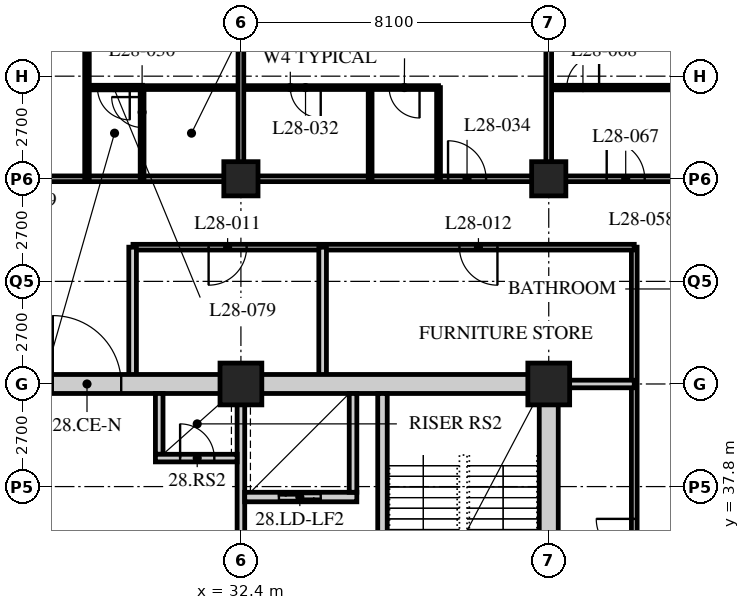
"""IFC4 building model, lengths in metres.
Left out: names, types, materials, properties, quantities, classifications, styles, units other than length and angle.
Written with IfcOpenShell. Run it as: python <this file> out.ifc"""

import sys

from ifc_helpers import new_model, si_unit, direction, frame, frame_2d, origin, origin_2d, place, context, subcontext, project, spatial, rectangle, hollow_rectangle, extrude, element, fill, save


model = new_model("IFC4")
c1 = context("Model", 3, precision=1e-05, world=origin(), true_north=direction((0.0, 1.0)))
c2 = subcontext(c1, "Body", "Model", "MODEL_VIEW")
j1 = project(units=[si_unit("LENGTHUNIT", "METRE"), si_unit("PLANEANGLEUNIT", "RADIAN")], contexts=[c1])
p1 = place(None, origin())
s1 = spatial("IfcSite", under=j1, at=p1, CompositionType="ELEMENT")
p2 = place(p1, origin())
s2 = spatial("IfcBuilding", under=s1, at=p2, CompositionType="ELEMENT")
p3 = place(p2, frame((0.0, 0.0, 113.6)))
s3 = spatial("IfcBuildingStorey", under=s2, at=p3, CompositionType="ELEMENT", Elevation=113.6)
p4 = place(p3, frame((32.4, 40.5, 0.0), z_axis=(0.0, 0.0, 1.0), x_axis=(1.0, 0.0, 0.0)))
e1 = element("IfcColumn", 1, at=p4, inside=s3, PredefinedType="COLUMN", context=c2, shape_type="SweptSolid", body=[
    extrude(hollow_rectangle(XDim=1.1, YDim=1.1, WallThickness=0.1, at=origin_2d()), origin(), (0.0, 0.0, 1.0), 3.4),
])
p5 = place(p3, frame((32.4, 45.9, 0.0), z_axis=(0.0, 0.0, 1.0), x_axis=(1.0, 0.0, 0.0)))
e2 = element("IfcColumn", 2, at=p5, inside=s3, PredefinedType="COLUMN", context=c2, shape_type="SweptSolid", body=[
    extrude(hollow_rectangle(XDim=0.9, YDim=0.9, WallThickness=0.09, at=origin_2d()), origin(), (0.0, 0.0, 1.0), 3.4),
])
p6 = place(p3, frame((40.5, 40.5, 0.0), z_axis=(0.0, 0.0, 1.0), x_axis=(1.0, 0.0, 0.0)))
e3 = element("IfcColumn", 3, at=p6, inside=s3, PredefinedType="COLUMN", context=c2, shape_type="SweptSolid", body=[
    extrude(hollow_rectangle(XDim=1.1, YDim=1.1, WallThickness=0.1, at=origin_2d()), origin(), (0.0, 0.0, 1.0), 3.4),
])
p7 = place(p3, frame((40.5, 45.9, 0.0), z_axis=(0.0, 0.0, 1.0), x_axis=(1.0, 0.0, 0.0)))
e4 = element("IfcColumn", 4, at=p7, inside=s3, PredefinedType="COLUMN", context=c2, shape_type="SweptSolid", body=[
    extrude(hollow_rectangle(XDim=0.9, YDim=0.9, WallThickness=0.09, at=origin_2d()), origin(), (0.0, 0.0, 1.0), 3.4),
])
p8 = place(p3, frame((12.15, 45.9, 0.0), z_axis=(0.0, 0.0, 1.0), x_axis=(1.0, 0.0, 0.0)))
e5 = element("IfcWall", 5, at=p8, inside=s3, PredefinedType="PARTITIONING", context=c2, shape_type="SweptSolid", body=[
    extrude(rectangle(XDim=32.4, YDim=0.15, at=frame_2d((16.2, 0.0))), origin(), (0.0, 0.0, 1.0), 2.578),
])
p9 = place(p8, frame((5.95, 0.0, 0.0)))
e6 = element("IfcOpeningElement", 6, at=p9, cuts=e5, PredefinedType="OPENING", context=c2, shape_type="SweptSolid", body=[
    extrude(rectangle(XDim=1.0, YDim=2.1, at=frame_2d((0.5, 1.05))), frame((0.0, 0.085, 0.0), z_axis=(0.0, -1.0, 0.0), x_axis=(1.0, 0.0, 0.0)), (0.0, 0.0, 1.0), 0.17),
])
p10 = place(p8, frame((14.05, 0.0, 0.0)))
e7 = element("IfcOpeningElement", 7, at=p10, cuts=e5, PredefinedType="OPENING", context=c2, shape_type="SweptSolid", body=[
    extrude(rectangle(XDim=1.0, YDim=2.1, at=frame_2d((0.5, 1.05))), frame((0.0, 0.085, 0.0), z_axis=(0.0, -1.0, 0.0), x_axis=(1.0, 0.0, 0.0)), (0.0, 0.0, 1.0), 0.17),
])
p11 = place(p8, frame((25.7, 0.0, 0.0)))
e8 = element("IfcOpeningElement", 8, at=p11, cuts=e5, PredefinedType="OPENING", context=c2, shape_type="SweptSolid", body=[
    extrude(rectangle(XDim=1.0, YDim=2.1, at=frame_2d((0.5, 1.05))), frame((0.0, 0.085, 0.0), z_axis=(0.0, -1.0, 0.0), x_axis=(1.0, 0.0, 0.0)), (0.0, 0.0, 1.0), 0.17),
])
p12 = place(p8, frame((29.875, 0.0, 0.0)))
e9 = element("IfcOpeningElement", 9, at=p12, cuts=e5, PredefinedType="OPENING", context=c2, shape_type="SweptSolid", body=[
    extrude(rectangle(XDim=1.0, YDim=2.1, at=frame_2d((0.5, 1.05))), frame((0.0, 0.085, 0.0), z_axis=(0.0, -1.0, 0.0), x_axis=(1.0, 0.0, 0.0)), (0.0, 0.0, 1.0), 0.17),
])
p13 = place(p8, frame((1.525, 0.0, 0.0)))
e10 = element("IfcOpeningElement", 10, at=p13, cuts=e5, PredefinedType="OPENING", context=c2, shape_type="SweptSolid", body=[
    extrude(rectangle(XDim=1.0, YDim=2.1, at=frame_2d((0.5, 1.05))), frame((0.0, 0.085, 0.0), z_axis=(0.0, -1.0, 0.0), x_axis=(1.0, 0.0, 0.0)), (0.0, 0.0, 1.0), 0.17),
])
p14 = place(p3, frame((42.75, 19.35, 0.0), z_axis=(0.0, 0.0, 1.0), x_axis=(0.0, 1.0, 0.0)))
e11 = element("IfcWall", 11, at=p14, inside=s3, PredefinedType="PARTITIONING", context=c2, shape_type="SweptSolid", body=[
    extrude(rectangle(XDim=24.75, YDim=0.15, at=frame_2d((12.375, 0.0))), origin(), (0.0, 0.0, 1.0), 3.19),
])
p15 = place(p14, frame((8.5, 0.0, 0.0)))
e12 = element("IfcOpeningElement", 12, at=p15, cuts=e11, PredefinedType="OPENING", context=c2, shape_type="SweptSolid", body=[
    extrude(rectangle(XDim=1.0, YDim=2.1, at=frame_2d((0.5, 1.05))), frame((0.0, 0.085, 0.0), z_axis=(0.0, -1.0, 0.0), x_axis=(1.0, 0.0, 0.0)), (0.0, 0.0, 1.0), 0.17),
])
p16 = place(p14, frame((16.6, 0.0, 0.0)))
e13 = element("IfcOpeningElement", 13, at=p16, cuts=e11, PredefinedType="OPENING", context=c2, shape_type="SweptSolid", body=[
    extrude(rectangle(XDim=1.0, YDim=2.1, at=frame_2d((0.5, 1.05))), frame((0.0, 0.085, 0.0), z_axis=(0.0, -1.0, 0.0), x_axis=(1.0, 0.0, 0.0)), (0.0, 0.0, 1.0), 0.17),
])
p17 = place(p3, frame((42.75, 44.1, 0.0), z_axis=(0.0, 0.0, 1.0), x_axis=(-1.0, 0.0, 0.0)))
e14 = element("IfcWall", 14, at=p17, inside=s3, PredefinedType="PARTITIONING", context=c2, shape_type="SweptSolid", body=[
    extrude(rectangle(XDim=13.19, YDim=0.15, at=frame_2d((6.595, 0.0))), origin(), (0.0, 0.0, 1.0), 3.19),
])
p18 = place(p17, frame((10.2, 0.0, 0.0)))
e15 = element("IfcOpeningElement", 15, at=p18, cuts=e14, PredefinedType="OPENING", context=c2, shape_type="SweptSolid", body=[
    extrude(rectangle(XDim=1.0, YDim=2.1, at=frame_2d((0.5, 1.05))), frame((0.0, 0.085, 0.0), z_axis=(0.0, -1.0, 0.0), x_axis=(1.0, 0.0, 0.0)), (0.0, 0.0, 1.0), 0.17),
])
p19 = place(p17, frame((3.6, 0.0, 0.0)))
e16 = element("IfcOpeningElement", 16, at=p19, cuts=e14, PredefinedType="OPENING", context=c2, shape_type="SweptSolid", body=[
    extrude(rectangle(XDim=1.0, YDim=2.1, at=frame_2d((0.5, 1.05))), frame((0.0, 0.085, 0.0), z_axis=(0.0, -1.0, 0.0), x_axis=(1.0, 0.0, 0.0)), (0.0, 0.0, 1.0), 0.17),
])
for number, where, z_axis, x_axis in (
    (17, (34.55, 44.1, 0.0), (0.0, 0.0, 1.0), (0.0, -1.0, 0.0)),
    (18, (29.55, 40.5, 0.0), (0.0, 0.0, 1.0), (0.0, 1.0, 0.0)),
):
    element("IfcWall", number, at=place(p3, frame(where, z_axis=z_axis, x_axis=x_axis)), inside=s3, PredefinedType="SOLIDWALL", context=c2, shape_type="SweptSolid", body=[
        extrude(rectangle(XDim=3.6, YDim=0.2, at=frame_2d((1.8, 0.0))), origin(), (0.0, 0.0, 1.0), 3.19),
    ])
p20 = place(p3, frame((40.5, 40.5, 0.0), z_axis=(0.0, 0.0, 1.0), x_axis=(1.0, 0.0, 0.0)))
e19 = element("IfcWall", 19, at=p20, inside=s3, PredefinedType="SOLIDWALL", context=c2, shape_type="SweptSolid", body=[
    extrude(rectangle(XDim=2.25, YDim=0.2, at=frame_2d((1.125, 0.0))), origin(), (0.0, 0.0, 1.0), 3.19),
])
p21 = place(p3, frame((29.8, 48.3, 0.0), z_axis=(0.0, 0.0, 1.0), x_axis=(1.0, 0.0, 0.0)))
e20 = element("IfcWall", 20, at=p21, inside=s3, PredefinedType="PARTITIONING", context=c2, shape_type="SweptSolid", body=[
    extrude(rectangle(XDim=7.8, YDim=0.1, at=frame_2d((3.9, 0.0))), origin(), (0.0, 0.0, 1.0), 3.19),
])
p22 = place(p21, frame((3.9, 0.0, 0.0)))
e21 = element("IfcOpeningElement", 21, at=p22, cuts=e20, PredefinedType="OPENING", context=c2, shape_type="SweptSolid", body=[
    extrude(rectangle(XDim=0.8, YDim=2.1, at=frame_2d((0.4, 1.05))), frame((0.0, 0.06, 0.0), z_axis=(0.0, -1.0, 0.0), x_axis=(1.0, 0.0, 0.0)), (0.0, 0.0, 1.0), 0.12),
])
p23 = place(p21, frame((6.5, 0.0, 0.0)))
e22 = element("IfcOpeningElement", 22, at=p23, cuts=e20, PredefinedType="OPENING", context=c2, shape_type="SweptSolid", body=[
    extrude(rectangle(XDim=0.8, YDim=2.1, at=frame_2d((0.4, 1.05))), frame((0.0, 0.06, 0.0), z_axis=(0.0, -1.0, 0.0), x_axis=(1.0, 0.0, 0.0)), (0.0, 0.0, 1.0), 0.12),
])
p24 = place(p3, frame((29.8, 45.9, 0.0), z_axis=(0.0, 0.0, 1.0), x_axis=(0.0, 1.0, 0.0)))
e23 = element("IfcWall", 23, at=p24, inside=s3, PredefinedType="PARTITIONING", context=c2, shape_type="SweptSolid", body=[
    extrude(rectangle(XDim=2.4, YDim=0.1, at=frame_2d((1.2, 0.0))), origin(), (0.0, 0.0, 1.0), 3.19),
])
p25 = place(p24, frame((1.35, 0.0, 0.0)))
e24 = element("IfcOpeningElement", 24, at=p25, cuts=e23, PredefinedType="OPENING", context=c2, shape_type="SweptSolid", body=[
    extrude(rectangle(XDim=0.8, YDim=2.1, at=frame_2d((0.4, 1.05))), frame((0.0, 0.06, 0.0), z_axis=(0.0, -1.0, 0.0), x_axis=(1.0, 0.0, 0.0)), (0.0, 0.0, 1.0), 0.12),
])
p26 = place(p3, frame((28.35, 45.9, 0.0), z_axis=(0.0, 0.0, 1.0), x_axis=(0.0, 1.0, 0.0)))
e25 = element("IfcWall", 25, at=p26, inside=s3, PredefinedType="PARTITIONING", context=c2, shape_type="SweptSolid", body=[
    extrude(rectangle(XDim=7.8, YDim=0.12, at=frame_2d((3.9, 0.0))), origin(), (0.0, 0.0, 1.0), 3.19),
])
p27 = place(p26, frame((4.825, 0.0, 0.0)))
e26 = element("IfcOpeningElement", 26, at=p27, cuts=e25, PredefinedType="OPENING", context=c2, shape_type="SweptSolid", body=[
    extrude(rectangle(XDim=0.85, YDim=2.1, at=frame_2d((0.425, 1.05))), frame((0.0, 0.07, 0.0), z_axis=(0.0, -1.0, 0.0), x_axis=(1.0, 0.0, 0.0)), (0.0, 0.0, 1.0), 0.14),
])
p28 = place(p3, frame((32.4, 45.9, 0.0), z_axis=(0.0, 0.0, 1.0), x_axis=(0.0, 1.0, 0.0)))
e27 = element("IfcWall", 27, at=p28, inside=s3, PredefinedType="PARTITIONING", context=c2, shape_type="SweptSolid", body=[
    extrude(rectangle(XDim=7.8, YDim=0.15, at=frame_2d((3.9, 0.0))), origin(), (0.0, 0.0, 1.0), 2.578),
])
for number, where, z_axis, x_axis in (
    (28, (35.8, 45.9, 0.0), (0.0, 0.0, 1.0), (0.0, 1.0, 0.0)),
    (29, (37.6, 45.9, 0.0), (0.0, 0.0, 1.0), (0.0, 1.0, 0.0)),
):
    element("IfcWall", number, at=place(p3, frame(where, z_axis=z_axis, x_axis=x_axis)), inside=s3, PredefinedType="PARTITIONING", context=c2, shape_type="SweptSolid", body=[
        extrude(rectangle(XDim=2.4, YDim=0.1, at=frame_2d((1.2, 0.0))), origin(), (0.0, 0.0, 1.0), 3.19),
    ])
p29 = place(p3, frame((40.5, 48.3, 0.0), z_axis=(0.0, 0.0, 1.0), x_axis=(1.0, 0.0, 0.0)))
e30 = element("IfcWall", 30, at=p29, inside=s3, PredefinedType="PARTITIONING", context=c2, shape_type="SweptSolid", body=[
    extrude(rectangle(XDim=8.05, YDim=0.12, at=frame_2d((4.025, 0.0))), origin(), (0.0, 0.0, 1.0), 3.19),
])
p30 = place(p29, frame((0.475, 0.0, 0.0)))
e31 = element("IfcOpeningElement", 31, at=p30, cuts=e30, PredefinedType="OPENING", context=c2, shape_type="SweptSolid", body=[
    extrude(rectangle(XDim=0.85, YDim=2.1, at=frame_2d((0.425, 1.05))), frame((0.0, 0.07, 0.0), z_axis=(0.0, -1.0, 0.0), x_axis=(1.0, 0.0, 0.0)), (0.0, 0.0, 1.0), 0.14),
])
p31 = place(p29, frame((4.325, 0.0, 0.0)))
e32 = element("IfcOpeningElement", 32, at=p31, cuts=e30, PredefinedType="OPENING", context=c2, shape_type="SweptSolid", body=[
    extrude(rectangle(XDim=0.85, YDim=2.1, at=frame_2d((0.425, 1.05))), frame((0.0, 0.07, 0.0), z_axis=(0.0, -1.0, 0.0), x_axis=(1.0, 0.0, 0.0)), (0.0, 0.0, 1.0), 0.14),
])
p32 = place(p3, frame((40.5, 45.9, 0.0), z_axis=(0.0, 0.0, 1.0), x_axis=(0.0, 1.0, 0.0)))
e33 = element("IfcWall", 33, at=p32, inside=s3, PredefinedType="PARTITIONING", context=c2, shape_type="SweptSolid", body=[
    extrude(rectangle(XDim=7.8, YDim=0.15, at=frame_2d((3.9, 0.0))), origin(), (0.0, 0.0, 1.0), 2.578),
])
p33 = place(p3, frame((28.35, 48.3, 0.0), z_axis=(0.0, 0.0, 1.0), x_axis=(1.0, 0.0, 0.0)))
e34 = element("IfcWall", 34, at=p33, inside=s3, PredefinedType="PARTITIONING", context=c2, shape_type="SweptSolid", body=[
    extrude(rectangle(XDim=1.46, YDim=0.12, at=frame_2d((0.73, 0.0))), origin(), (0.0, 0.0, 1.0), 3.19),
])
p34 = place(p33, frame((0.275, 0.0, 0.0)))
e35 = element("IfcOpeningElement", 35, at=p34, cuts=e34, PredefinedType="OPENING", context=c2, shape_type="SweptSolid", body=[
    extrude(rectangle(XDim=0.85, YDim=2.1, at=frame_2d((0.425, 1.05))), frame((0.0, 0.07, 0.0), z_axis=(0.0, -1.0, 0.0), x_axis=(1.0, 0.0, 0.0)), (0.0, 0.0, 1.0), 0.14),
])
p35 = place(p3, frame((15.95, 40.5, 0.0), z_axis=(0.0, 0.0, 1.0), x_axis=(1.0, 0.0, 0.0)))
e36 = element("IfcWall", 36, at=p35, inside=s3, PredefinedType="SOLIDWALL", context=c2, shape_type="SweptSolid", body=[
    extrude(rectangle(XDim=24.8, YDim=0.5, at=frame_2d((12.4, 0.0))), origin(), (0.0, 0.0, 1.0), 2.54),
])
p36 = place(p35, frame((11.5, 0.0, 0.0)))
e37 = element("IfcOpeningElement", 37, at=p36, cuts=e36, PredefinedType="OPENING", context=c2, shape_type="SweptSolid", body=[
    extrude(rectangle(XDim=1.8, YDim=2.4, at=frame_2d((0.9, 1.2))), frame((0.0, 0.26, 0.0), z_axis=(0.0, -1.0, 0.0), x_axis=(1.0, 0.0, 0.0)), (0.0, 0.0, 1.0), 0.52),
])
p37 = place(p3, frame((40.5, 24.55, 0.0), z_axis=(0.0, 0.0, 1.0), x_axis=(0.0, 1.0, 0.0)))
e38 = element("IfcWall", 38, at=p37, inside=s3, PredefinedType="SOLIDWALL", context=c2, shape_type="SweptSolid", body=[
    extrude(rectangle(XDim=15.7, YDim=0.5, at=frame_2d((7.85, 0.0))), origin(), (0.0, 0.0, 1.0), 2.578),
])
p38 = place(p3, frame((32.4, 32.5, 0.0), z_axis=(0.0, 0.0, 1.0), x_axis=(0.0, 1.0, 0.0)))
e39 = element("IfcWall", 39, at=p38, inside=s3, PredefinedType="SOLIDWALL", context=c2, shape_type="SweptSolid", body=[
    extrude(rectangle(XDim=7.75, YDim=0.2, at=frame_2d((3.875, 0.0))), origin(), (0.0, 0.0, 1.0), 2.578),
])
p39 = place(p38, frame((1.9, 0.0, 0.0)))
e40 = element("IfcOpeningElement", 40, at=p39, cuts=e39, PredefinedType="OPENING", context=c2, shape_type="SweptSolid", body=[
    extrude(rectangle(XDim=1.2, YDim=2.1, at=frame_2d((0.6, 1.05))), frame((0.0, 0.11, 0.0), z_axis=(0.0, -1.0, 0.0), x_axis=(1.0, 0.0, 0.0)), (0.0, 0.0, 1.0), 0.22),
])
p40 = place(p3, frame((36.125, 32.5, 0.0), z_axis=(0.0, 0.0, 1.0), x_axis=(0.0, 1.0, 0.0)))
e41 = element("IfcWall", 41, at=p40, inside=s3, PredefinedType="SOLIDWALL", context=c2, shape_type="SweptSolid", body=[
    extrude(rectangle(XDim=7.75, YDim=0.25, at=frame_2d((3.875, 0.0))), origin(), (0.0, 0.0, 1.0), 3.19),
])
p41 = place(p40, frame((0.45, 0.0, 0.0)))
e42 = element("IfcOpeningElement", 42, at=p41, cuts=e41, PredefinedType="OPENING", context=c2, shape_type="SweptSolid", body=[
    extrude(rectangle(XDim=1.2, YDim=2.1, at=frame_2d((0.6, 1.05))), frame((0.0, 0.135, 0.0), z_axis=(0.0, -1.0, 0.0), x_axis=(1.0, 0.0, 0.0)), (0.0, 0.0, 1.0), 0.27),
])
p42 = place(p3, frame((32.5, 37.525, 0.0), z_axis=(0.0, 0.0, 1.0), x_axis=(1.0, 0.0, 0.0)))
e43 = element("IfcWall", 43, at=p42, inside=s3, PredefinedType="SOLIDWALL", context=c2, shape_type="SweptSolid", body=[
    extrude(rectangle(XDim=2.95, YDim=0.25, at=frame_2d((1.475, 0.0))), origin(), (0.0, 0.0, 1.0), 3.19),
])
p43 = place(p42, frame((0.9, 0.0, 0.0)))
e44 = element("IfcOpeningElement", 44, at=p43, cuts=e43, PredefinedType="OPENING", context=c2, shape_type="SweptSolid", body=[
    extrude(rectangle(XDim=1.1, YDim=2.4, at=frame_2d((0.55, 1.2))), frame((0.0, 0.135, 0.0), z_axis=(0.0, -1.0, 0.0), x_axis=(1.0, 0.0, 0.0)), (0.0, 0.0, 1.0), 0.27),
])
p44 = place(p3, frame((35.35, 37.65, 0.0), z_axis=(0.0, 0.0, 1.0), x_axis=(0.0, 1.0, 0.0)))
e45 = element("IfcWall", 45, at=p44, inside=s3, PredefinedType="SOLIDWALL", context=c2, shape_type="SweptSolid", body=[
    extrude(rectangle(XDim=2.6, YDim=0.2, at=frame_2d((1.3, 0.0))), origin(), (0.0, 0.0, 1.0), 3.19),
])
p45 = place(p3, frame((30.25, 38.65, 0.0), z_axis=(0.0, 0.0, 1.0), x_axis=(0.0, 1.0, 0.0)))
e46 = element("IfcWall", 46, at=p45, inside=s3, PredefinedType="SOLIDWALL", context=c2, shape_type="SweptSolid", body=[
    extrude(rectangle(XDim=1.6, YDim=0.2, at=frame_2d((0.8, 0.0))), origin(), (0.0, 0.0, 1.0), 3.19),
])
p46 = place(p3, frame((30.15, 38.55, 0.0), z_axis=(0.0, 0.0, 1.0), x_axis=(1.0, 0.0, 0.0)))
e47 = element("IfcWall", 47, at=p46, inside=s3, PredefinedType="SOLIDWALL", context=c2, shape_type="SweptSolid", body=[
    extrude(rectangle(XDim=2.15, YDim=0.2, at=frame_2d((1.075, 0.0))), origin(), (0.0, 0.0, 1.0), 3.19),
])
p47 = place(p46, frame((0.65, 0.0, 0.0)))
e48 = element("IfcOpeningElement", 48, at=p47, cuts=e47, PredefinedType="OPENING", context=c2, shape_type="SweptSolid", body=[
    extrude(rectangle(XDim=0.9, YDim=2.1, at=frame_2d((0.45, 1.05))), frame((0.0, 0.11, 0.0), z_axis=(0.0, -1.0, 0.0), x_axis=(1.0, 0.0, 0.0)), (0.0, 0.0, 1.0), 0.22),
])
p48 = place(p16, origin())
e49 = element("IfcDoor", 49, at=p48, inside=s3, OperationType="SINGLE_SWING_RIGHT", PredefinedType="DOOR", context=c2, shape_type="SweptSolid", body=[
    extrude(rectangle(XDim=1.0, YDim=2.1, at=frame_2d((0.5, 1.05))), frame((0.0, 0.025, 0.0), z_axis=(0.0, -1.0, 0.0), x_axis=(1.0, 0.0, 0.0)), (0.0, 0.0, 1.0), 0.05),
])
fill(e13, e49)
p49 = place(p18, origin())
e50 = element("IfcDoor", 50, at=p49, inside=s3, OperationType="SINGLE_SWING_RIGHT", PredefinedType="DOOR", context=c2, shape_type="SweptSolid", body=[
    extrude(rectangle(XDim=1.0, YDim=2.1, at=frame_2d((0.5, 1.05))), frame((0.0, 0.025, 0.0), z_axis=(0.0, -1.0, 0.0), x_axis=(1.0, 0.0, 0.0)), (0.0, 0.0, 1.0), 0.05),
])
fill(e15, e50)
p50 = place(p19, origin())
e51 = element("IfcDoor", 51, at=p50, inside=s3, OperationType="SINGLE_SWING_LEFT", PredefinedType="DOOR", context=c2, shape_type="SweptSolid", body=[
    extrude(rectangle(XDim=1.0, YDim=2.1, at=frame_2d((0.5, 1.05))), frame((0.0, 0.025, 0.0), z_axis=(0.0, -1.0, 0.0), x_axis=(1.0, 0.0, 0.0)), (0.0, 0.0, 1.0), 0.05),
])
fill(e16, e51)
p51 = place(p25, origin())
e52 = element("IfcDoor", 52, at=p51, inside=s3, OperationType="SINGLE_SWING_RIGHT", PredefinedType="DOOR", context=c2, shape_type="SweptSolid", body=[
    extrude(rectangle(XDim=0.8, YDim=2.1, at=frame_2d((0.4, 1.05))), frame((0.0, 0.025, 0.0), z_axis=(0.0, -1.0, 0.0), x_axis=(1.0, 0.0, 0.0)), (0.0, 0.0, 1.0), 0.05),
])
fill(e24, e52)
p52 = place(p22, origin())
e53 = element("IfcDoor", 53, at=p52, inside=s3, OperationType="SINGLE_SWING_LEFT", PredefinedType="DOOR", context=c2, shape_type="SweptSolid", body=[
    extrude(rectangle(XDim=0.8, YDim=2.1, at=frame_2d((0.4, 1.05))), frame((0.0, 0.025, 0.0), z_axis=(0.0, -1.0, 0.0), x_axis=(1.0, 0.0, 0.0)), (0.0, 0.0, 1.0), 0.05),
])
fill(e21, e53)
p53 = place(p23, origin())
e54 = element("IfcDoor", 54, at=p53, inside=s3, OperationType="SINGLE_SWING_LEFT", PredefinedType="DOOR", context=c2, shape_type="SweptSolid", body=[
    extrude(rectangle(XDim=0.8, YDim=2.1, at=frame_2d((0.4, 1.05))), frame((0.0, 0.025, 0.0), z_axis=(0.0, -1.0, 0.0), x_axis=(1.0, 0.0, 0.0)), (0.0, 0.0, 1.0), 0.05),
])
fill(e22, e54)
p54 = place(p11, origin())
e55 = element("IfcDoor", 55, at=p54, inside=s3, OperationType="SINGLE_SWING_LEFT", PredefinedType="DOOR", context=c2, shape_type="SweptSolid", body=[
    extrude(rectangle(XDim=1.0, YDim=2.1, at=frame_2d((0.5, 1.05))), frame((0.0, 0.025, 0.0), z_axis=(0.0, -1.0, 0.0), x_axis=(1.0, 0.0, 0.0)), (0.0, 0.0, 1.0), 0.05),
])
fill(e8, e55)
p55 = place(p12, origin())
e56 = element("IfcDoor", 56, at=p55, inside=s3, OperationType="SINGLE_SWING_LEFT", PredefinedType="DOOR", context=c2, shape_type="SweptSolid", body=[
    extrude(rectangle(XDim=1.0, YDim=2.1, at=frame_2d((0.5, 1.05))), frame((0.0, 0.025, 0.0), z_axis=(0.0, -1.0, 0.0), x_axis=(1.0, 0.0, 0.0)), (0.0, 0.0, 1.0), 0.05),
])
fill(e9, e56)
p56 = place(p30, origin())
e57 = element("IfcDoor", 57, at=p56, inside=s3, OperationType="SINGLE_SWING_RIGHT", PredefinedType="DOOR", context=c2, shape_type="SweptSolid", body=[
    extrude(rectangle(XDim=0.85, YDim=2.1, at=frame_2d((0.425, 1.05))), frame((0.0, 0.025, 0.0), z_axis=(0.0, -1.0, 0.0), x_axis=(1.0, 0.0, 0.0)), (0.0, 0.0, 1.0), 0.05),
])
fill(e31, e57)
p57 = place(p34, origin())
e58 = element("IfcDoor", 58, at=p57, inside=s3, OperationType="SINGLE_SWING_LEFT", PredefinedType="DOOR", context=c2, shape_type="SweptSolid", body=[
    extrude(rectangle(XDim=0.85, YDim=2.1, at=frame_2d((0.425, 1.05))), frame((0.0, 0.025, 0.0), z_axis=(0.0, -1.0, 0.0), x_axis=(1.0, 0.0, 0.0)), (0.0, 0.0, 1.0), 0.05),
])
fill(e35, e58)
p58 = place(p47, origin())
e59 = element("IfcDoor", 59, at=p58, inside=s3, OperationType="SINGLE_SWING_LEFT", PredefinedType="DOOR", context=c2, shape_type="SweptSolid", body=[
    extrude(rectangle(XDim=0.9, YDim=2.1, at=frame_2d((0.45, 1.05))), frame((0.0, 0.025, 0.0), z_axis=(0.0, -1.0, 0.0), x_axis=(1.0, 0.0, 0.0)), (0.0, 0.0, 1.0), 0.05),
])
fill(e48, e59)
p59 = place(p43, origin())
e60 = element("IfcDoor", 60, at=p59, inside=s3, OperationType="DOUBLE_DOOR_SLIDING", PredefinedType="DOOR", context=c2, shape_type="SweptSolid", body=[
    extrude(rectangle(XDim=1.1, YDim=2.4, at=frame_2d((0.55, 1.2))), frame((0.0, 0.025, 0.0), z_axis=(0.0, -1.0, 0.0), x_axis=(1.0, 0.0, 0.0)), (0.0, 0.0, 1.0), 0.05),
])
fill(e44, e60)
p60 = place(p36, origin())
e61 = element("IfcDoor", 61, at=p60, inside=s3, OperationType="DOUBLE_DOOR_SINGLE_SWING", PredefinedType="DOOR", context=c2, shape_type="SweptSolid", body=[
    extrude(rectangle(XDim=1.8, YDim=2.4, at=frame_2d((0.9, 1.2))), frame((0.0, 0.025, 0.0), z_axis=(0.0, -1.0, 0.0), x_axis=(1.0, 0.0, 0.0)), (0.0, 0.0, 1.0), 0.05),
])
fill(e37, e61)
save(model, sys.argv[1])
